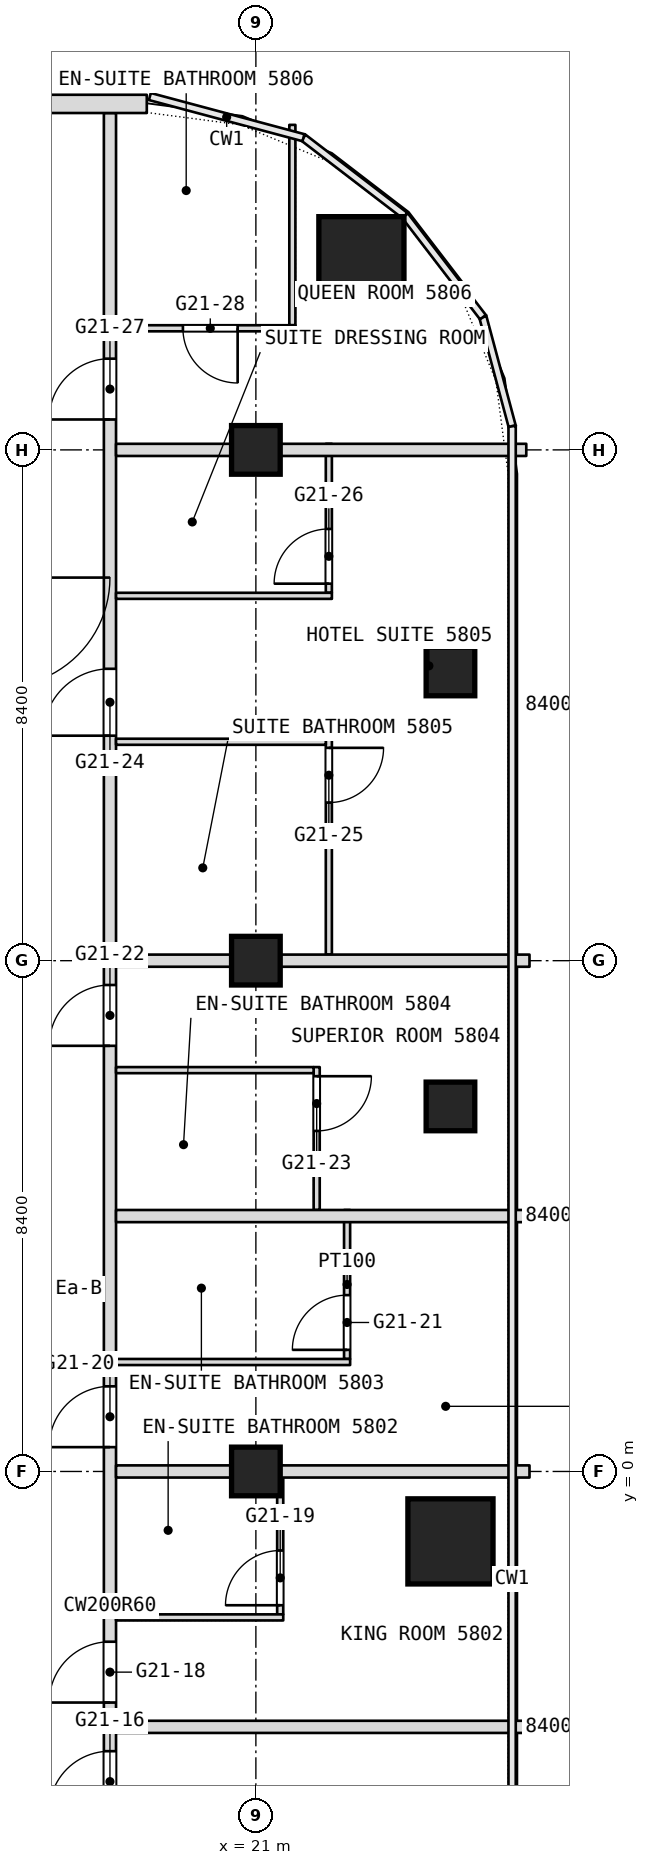
"""IFC4 building model, lengths in metres.
Left out: names, types, materials, properties, quantities, classifications, styles, units other than length and angle.
Written with IfcOpenShell. Run it as: python <this file> out.ifc"""

import sys

from ifc_helpers import new_model, si_unit, direction, frame, frame_2d, origin, origin_2d, place, context, subcontext, project, spatial, rectangle, extrude, element, fill, save


model = new_model("IFC4")
c1 = context("Model", 3, precision=1e-05, world=origin(), true_north=direction((0.0, 1.0)))
c2 = subcontext(c1, "Body", "Model", "MODEL_VIEW")
j1 = project(units=[si_unit("LENGTHUNIT", "METRE"), si_unit("PLANEANGLEUNIT", "RADIAN")], contexts=[c1])
p1 = place(None, origin())
s1 = spatial("IfcSite", under=j1, at=p1, CompositionType="ELEMENT")
p2 = place(p1, origin())
s2 = spatial("IfcBuilding", under=s1, at=p2, CompositionType="ELEMENT")
p3 = place(p2, frame((0.0, 0.0, 245.3)))
s3 = spatial("IfcBuildingStorey", under=s2, at=p3, CompositionType="ELEMENT", Elevation=245.3)
for number, where, z_axis, x_axis in (
    (1, (24.2, -1.15, 0.0), (0.0, 0.0, 1.0), (1.0, 0.0, 0.0)),
    (2, (22.736, 19.936, 0.0), (0.0, 0.0, 1.0), (1.0, 0.0, 0.0)),
):
    element("IfcColumn", number, at=place(p3, frame(where, z_axis=z_axis, x_axis=x_axis)), inside=s3, PredefinedType="COLUMN", context=c2, shape_type="SweptSolid", body=[
        extrude(rectangle(XDim=1.4, YDim=1.4, at=origin_2d()), origin(), (0.0, 0.0, 1.0), 3.6),
    ])
for number, where, z_axis, x_axis in (
    (3, (21.0, 0.0, 0.0), (0.0, 0.0, 1.0), (1.0, 0.0, 0.0)),
    (4, (21.0, 8.4, 0.0), (0.0, 0.0, 1.0), (1.0, 0.0, 0.0)),
    (5, (21.0, 16.8, 0.0), (0.0, 0.0, 1.0), (1.0, 0.0, 0.0)),
    (6, (24.2, 13.156, 0.0), (0.0, 0.0, 1.0), (1.0, 0.0, 0.0)),
    (7, (24.2, 6.003, 0.0), (0.0, 0.0, 1.0), (1.0, 0.0, 0.0)),
):
    element("IfcColumn", number, at=place(p3, frame(where, z_axis=z_axis, x_axis=x_axis)), inside=s3, PredefinedType="COLUMN", context=c2, shape_type="SweptSolid", body=[
        extrude(rectangle(XDim=0.8, YDim=0.8, at=origin_2d()), origin(), (0.0, 0.0, 1.0), 3.6),
    ])
p4 = place(p3, frame((22.5, 1.85, 0.0), z_axis=(0.0, 0.0, 1.0), x_axis=(0.0, 1.0, 0.0)))
e8 = element("IfcWall", 8, at=p4, inside=s3, PredefinedType="PARTITIONING", context=c2, shape_type="SweptSolid", body=[
    extrude(rectangle(XDim=2.45, YDim=0.1, at=frame_2d((1.225, 0.0))), origin(), (0.0, 0.0, 1.0), 3.34),
])
p5 = place(p4, frame((0.15, 0.0, 0.0)))
e9 = element("IfcOpeningElement", 9, at=p5, cuts=e8, PredefinedType="OPENING", context=c2, shape_type="SweptSolid", body=[
    extrude(rectangle(XDim=0.9, YDim=2.1, at=frame_2d((0.45, 1.05))), frame((0.0, 0.05, 0.0), z_axis=(0.0, -1.0, 0.0), x_axis=(1.0, 0.0, 0.0)), (0.0, 0.0, 1.0), 0.1),
])
p6 = place(p3, frame((22.2, 8.5, 0.0), z_axis=(0.0, 0.0, 1.0), x_axis=(0.0, 1.0, 0.0)))
e10 = element("IfcWall", 10, at=p6, inside=s3, PredefinedType="PARTITIONING", context=c2, shape_type="SweptSolid", body=[
    extrude(rectangle(XDim=3.55, YDim=0.1, at=frame_2d((1.775, 0.0))), origin(), (0.0, 0.0, 1.0), 3.34),
])
p7 = place(p6, frame((2.5, 0.0, 0.0)))
e11 = element("IfcOpeningElement", 11, at=p7, cuts=e10, PredefinedType="OPENING", context=c2, shape_type="SweptSolid", body=[
    extrude(rectangle(XDim=0.9, YDim=2.1, at=frame_2d((0.45, 1.05))), frame((0.0, 0.05, 0.0), z_axis=(0.0, -1.0, 0.0), x_axis=(1.0, 0.0, 0.0)), (0.0, 0.0, 1.0), 0.1),
])
p8 = place(p3, frame((22.2, 14.45, 0.0), z_axis=(0.0, 0.0, 1.0), x_axis=(0.0, 1.0, 0.0)))
e12 = element("IfcWall", 12, at=p8, inside=s3, PredefinedType="PARTITIONING", context=c2, shape_type="SweptSolid", body=[
    extrude(rectangle(XDim=2.45, YDim=0.1, at=frame_2d((1.225, 0.0))), origin(), (0.0, 0.0, 1.0), 3.34),
])
p9 = place(p8, frame((0.15, 0.0, 0.0)))
e13 = element("IfcOpeningElement", 13, at=p9, cuts=e12, PredefinedType="OPENING", context=c2, shape_type="SweptSolid", body=[
    extrude(rectangle(XDim=0.9, YDim=2.1, at=frame_2d((0.45, 1.05))), frame((0.0, 0.05, 0.0), z_axis=(0.0, -1.0, 0.0), x_axis=(1.0, 0.0, 0.0)), (0.0, 0.0, 1.0), 0.1),
])
p10 = place(p3, frame((22.0, 4.3, 0.0), z_axis=(0.0, 0.0, 1.0), x_axis=(0.0, 1.0, 0.0)))
e14 = element("IfcWall", 14, at=p10, inside=s3, PredefinedType="PARTITIONING", context=c2, shape_type="SweptSolid", body=[
    extrude(rectangle(XDim=2.35, YDim=0.1, at=frame_2d((1.175, 0.0))), origin(), (0.0, 0.0, 1.0), 3.34),
])
p11 = place(p10, frame((1.3, 0.0, 0.0)))
e15 = element("IfcOpeningElement", 15, at=p11, cuts=e14, PredefinedType="OPENING", context=c2, shape_type="SweptSolid", body=[
    extrude(rectangle(XDim=0.9, YDim=2.1, at=frame_2d((0.45, 1.05))), frame((0.0, 0.05, 0.0), z_axis=(0.0, -1.0, 0.0), x_axis=(1.0, 0.0, 0.0)), (0.0, 0.0, 1.0), 0.1),
])
p12 = place(p3, frame((21.6, 18.85, 0.0), z_axis=(0.0, 0.0, 1.0), x_axis=(0.0, 1.0, 0.0)))
e16 = element("IfcWall", 16, at=p12, inside=s3, PredefinedType="PARTITIONING", context=c2, shape_type="SweptSolid", body=[
    extrude(rectangle(XDim=3.295, YDim=0.1, at=frame_2d((1.647, 0.0))), origin(), (0.0, 0.0, 1.0), 3.34),
])
p13 = place(p3, frame((21.4, -2.35, 0.0), z_axis=(0.0, 0.0, 1.0), x_axis=(0.0, 1.0, 0.0)))
e17 = element("IfcWall", 17, at=p13, inside=s3, PredefinedType="PARTITIONING", context=c2, shape_type="SweptSolid", body=[
    extrude(rectangle(XDim=2.45, YDim=0.1, at=frame_2d((1.225, 0.0))), origin(), (0.0, 0.0, 1.0), 3.34),
])
p14 = place(p13, frame((0.15, 0.0, 0.0)))
e18 = element("IfcOpeningElement", 18, at=p14, cuts=e17, PredefinedType="OPENING", context=c2, shape_type="SweptSolid", body=[
    extrude(rectangle(XDim=0.9, YDim=2.1, at=frame_2d((0.45, 1.05))), frame((0.0, 0.05, 0.0), z_axis=(0.0, -1.0, 0.0), x_axis=(1.0, 0.0, 0.0)), (0.0, 0.0, 1.0), 0.1),
])
p15 = place(p3, frame((18.6, -26.751, 0.0), z_axis=(0.0, 0.0, 1.0), x_axis=(0.0, 1.0, 0.0)))
e19 = element("IfcWall", 19, at=p15, inside=s3, PredefinedType="PARTITIONING", context=c2, shape_type="SweptSolid", body=[
    extrude(rectangle(XDim=49.091, YDim=0.2, at=frame_2d((24.545, 0.0))), origin(), (0.0, 0.0, 1.0), 3.34),
])
p16 = place(p15, frame((4.226, 0.0, 0.0)))
e20 = element("IfcOpeningElement", 20, at=p16, cuts=e19, PredefinedType="OPENING", context=c2, shape_type="SweptSolid", body=[
    extrude(rectangle(XDim=1.8, YDim=2.1, at=frame_2d((0.9, 1.05))), frame((0.0, 0.1, 0.0), z_axis=(0.0, -1.0, 0.0), x_axis=(1.0, 0.0, 0.0)), (0.0, 0.0, 1.0), 0.2),
])
p17 = place(p15, frame((13.251, 0.0, 0.0)))
e21 = element("IfcOpeningElement", 21, at=p17, cuts=e19, PredefinedType="OPENING", context=c2, shape_type="SweptSolid", body=[
    extrude(rectangle(XDim=1.8, YDim=2.1, at=frame_2d((0.9, 1.05))), frame((0.0, 0.1, 0.0), z_axis=(0.0, -1.0, 0.0), x_axis=(1.0, 0.0, 0.0)), (0.0, 0.0, 1.0), 0.2),
])
p18 = place(p15, frame((21.151, 0.0, 0.0)))
e22 = element("IfcOpeningElement", 22, at=p18, cuts=e19, PredefinedType="OPENING", context=c2, shape_type="SweptSolid", body=[
    extrude(rectangle(XDim=1.0, YDim=2.1, at=frame_2d((0.5, 1.05))), frame((0.0, 0.1, 0.0), z_axis=(0.0, -1.0, 0.0), x_axis=(1.0, 0.0, 0.0)), (0.0, 0.0, 1.0), 0.2),
])
p19 = place(p15, frame((22.951, 0.0, 0.0)))
e23 = element("IfcOpeningElement", 23, at=p19, cuts=e19, PredefinedType="OPENING", context=c2, shape_type="SweptSolid", body=[
    extrude(rectangle(XDim=1.0, YDim=2.1, at=frame_2d((0.5, 1.05))), frame((0.0, 0.1, 0.0), z_axis=(0.0, -1.0, 0.0), x_axis=(1.0, 0.0, 0.0)), (0.0, 0.0, 1.0), 0.2),
])
p20 = place(p15, frame((27.151, 0.0, 0.0)))
e24 = element("IfcOpeningElement", 24, at=p20, cuts=e19, PredefinedType="OPENING", context=c2, shape_type="SweptSolid", body=[
    extrude(rectangle(XDim=1.0, YDim=2.1, at=frame_2d((0.5, 1.05))), frame((0.0, 0.1, 0.0), z_axis=(0.0, -1.0, 0.0), x_axis=(1.0, 0.0, 0.0)), (0.0, 0.0, 1.0), 0.2),
])
p21 = place(p15, frame((33.751, 0.0, 0.0)))
e25 = element("IfcOpeningElement", 25, at=p21, cuts=e19, PredefinedType="OPENING", context=c2, shape_type="SweptSolid", body=[
    extrude(rectangle(XDim=1.0, YDim=2.1, at=frame_2d((0.5, 1.05))), frame((0.0, 0.1, 0.0), z_axis=(0.0, -1.0, 0.0), x_axis=(1.0, 0.0, 0.0)), (0.0, 0.0, 1.0), 0.2),
])
p22 = place(p15, frame((38.851, 0.0, 0.0)))
e26 = element("IfcOpeningElement", 26, at=p22, cuts=e19, PredefinedType="OPENING", context=c2, shape_type="SweptSolid", body=[
    extrude(rectangle(XDim=1.1, YDim=2.1, at=frame_2d((0.55, 1.05))), frame((0.0, 0.1, 0.0), z_axis=(0.0, -1.0, 0.0), x_axis=(1.0, 0.0, 0.0)), (0.0, 0.0, 1.0), 0.2),
])
p23 = place(p15, frame((44.051, 0.0, 0.0)))
e27 = element("IfcOpeningElement", 27, at=p23, cuts=e19, PredefinedType="OPENING", context=c2, shape_type="SweptSolid", body=[
    extrude(rectangle(XDim=1.0, YDim=2.1, at=frame_2d((0.5, 1.05))), frame((0.0, 0.1, 0.0), z_axis=(0.0, -1.0, 0.0), x_axis=(1.0, 0.0, 0.0)), (0.0, 0.0, 1.0), 0.2),
])
p24 = place(p3, frame((18.7, -4.2, 0.0), z_axis=(0.0, 0.0, 1.0), x_axis=(1.0, 0.0, 0.0)))
e28 = element("IfcWall", 28, at=p24, inside=s3, PredefinedType="PARTITIONING", context=c2, shape_type="SweptSolid", body=[
    extrude(rectangle(XDim=6.8, YDim=0.2, at=frame_2d((3.4, 0.0))), origin(), (0.0, 0.0, 1.0), 3.34),
])
p25 = place(p3, frame((18.7, -2.4, 0.0), z_axis=(0.0, 0.0, 1.0), x_axis=(1.0, 0.0, 0.0)))
e29 = element("IfcWall", 29, at=p25, inside=s3, PredefinedType="PARTITIONING", context=c2, shape_type="SweptSolid", body=[
    extrude(rectangle(XDim=2.75, YDim=0.1, at=frame_2d((1.375, 0.0))), origin(), (0.0, 0.0, 1.0), 3.34),
])
p26 = place(p3, frame((18.7, 0.0, 0.0), z_axis=(0.0, 0.0, 1.0), x_axis=(1.0, 0.0, 0.0)))
e30 = element("IfcWall", 30, at=p26, inside=s3, PredefinedType="PARTITIONING", context=c2, shape_type="SweptSolid", body=[
    extrude(rectangle(XDim=6.8, YDim=0.2, at=frame_2d((3.4, 0.0))), origin(), (0.0, 0.0, 1.0), 2.94),
])
p27 = place(p3, frame((18.7, 1.8, 0.0), z_axis=(0.0, 0.0, 1.0), x_axis=(1.0, 0.0, 0.0)))
e31 = element("IfcWall", 31, at=p27, inside=s3, PredefinedType="PARTITIONING", context=c2, shape_type="SweptSolid", body=[
    extrude(rectangle(XDim=3.85, YDim=0.1, at=frame_2d((1.925, 0.0))), origin(), (0.0, 0.0, 1.0), 3.34),
])
p28 = place(p3, frame((18.7, 4.2, 0.0), z_axis=(0.0, 0.0, 1.0), x_axis=(1.0, 0.0, 0.0)))
e32 = element("IfcWall", 32, at=p28, inside=s3, PredefinedType="PARTITIONING", context=c2, shape_type="SweptSolid", body=[
    extrude(rectangle(XDim=6.8, YDim=0.2, at=frame_2d((3.4, 0.0))), origin(), (0.0, 0.0, 1.0), 3.34),
])
p29 = place(p3, frame((18.7, 6.6, 0.0), z_axis=(0.0, 0.0, 1.0), x_axis=(1.0, 0.0, 0.0)))
e33 = element("IfcWall", 33, at=p29, inside=s3, PredefinedType="PARTITIONING", context=c2, shape_type="SweptSolid", body=[
    extrude(rectangle(XDim=3.25, YDim=0.1, at=frame_2d((1.625, 0.0))), origin(), (0.0, 0.0, 1.0), 3.34),
])
p30 = place(p3, frame((18.7, 8.4, 0.0), z_axis=(0.0, 0.0, 1.0), x_axis=(1.0, 0.0, 0.0)))
e34 = element("IfcWall", 34, at=p30, inside=s3, PredefinedType="PARTITIONING", context=c2, shape_type="SweptSolid", body=[
    extrude(rectangle(XDim=6.8, YDim=0.2, at=frame_2d((3.4, 0.0))), origin(), (0.0, 0.0, 1.0), 2.94),
])
p31 = place(p3, frame((18.7, 12.0, 0.0), z_axis=(0.0, 0.0, 1.0), x_axis=(1.0, 0.0, 0.0)))
e35 = element("IfcWall", 35, at=p31, inside=s3, PredefinedType="PARTITIONING", context=c2, shape_type="SweptSolid", body=[
    extrude(rectangle(XDim=3.45, YDim=0.1, at=frame_2d((1.725, 0.0))), origin(), (0.0, 0.0, 1.0), 3.34),
])
p32 = place(p3, frame((18.7, 14.4, 0.0), z_axis=(0.0, 0.0, 1.0), x_axis=(1.0, 0.0, 0.0)))
e36 = element("IfcWall", 36, at=p32, inside=s3, PredefinedType="PARTITIONING", context=c2, shape_type="SweptSolid", body=[
    extrude(rectangle(XDim=3.55, YDim=0.1, at=frame_2d((1.775, 0.0))), origin(), (0.0, 0.0, 1.0), 3.34),
])
p33 = place(p3, frame((18.7, 16.8, 0.0), z_axis=(0.0, 0.0, 1.0), x_axis=(1.0, 0.0, 0.0)))
e37 = element("IfcWall", 37, at=p33, inside=s3, PredefinedType="PARTITIONING", context=c2, shape_type="SweptSolid", body=[
    extrude(rectangle(XDim=6.747, YDim=0.2, at=frame_2d((3.374, 0.0))), origin(), (0.0, 0.0, 1.0), 2.94),
])
p34 = place(p3, frame((18.7, 18.8, 0.0), z_axis=(0.0, 0.0, 1.0), x_axis=(1.0, 0.0, 0.0)))
e38 = element("IfcWall", 38, at=p34, inside=s3, PredefinedType="PARTITIONING", context=c2, shape_type="SweptSolid", body=[
    extrude(rectangle(XDim=2.95, YDim=0.1, at=frame_2d((1.475, 0.0))), origin(), (0.0, 0.0, 1.0), 3.34),
])
p35 = place(p34, frame((1.1, 0.0, 0.0)))
e39 = element("IfcOpeningElement", 39, at=p35, cuts=e38, PredefinedType="OPENING", context=c2, shape_type="SweptSolid", body=[
    extrude(rectangle(XDim=0.9, YDim=2.1, at=frame_2d((0.45, 1.05))), frame((0.0, 0.05, 0.0), z_axis=(0.0, -1.0, 0.0), x_axis=(1.0, 0.0, 0.0)), (0.0, 0.0, 1.0), 0.1),
])
p36 = place(p3, frame((19.206, 22.49, 0.0), z_axis=(0.0, 0.0, 1.0), x_axis=(-1.0, 0.0, 0.0)))
e40 = element("IfcWall", 40, at=p36, inside=s3, PredefinedType="NOTDEFINED", context=c2, shape_type="SweptSolid", body=[
    extrude(rectangle(XDim=38.412, YDim=0.3, at=frame_2d((19.206, 0.0))), origin(), (0.0, 0.0, 1.0), 3.6),
])
p37 = place(p36, frame((3.306, 0.0, 0.9)))
e41 = element("IfcOpeningElement", 41, at=p37, cuts=e40, PredefinedType="OPENING", context=c2, shape_type="SweptSolid", body=[
    extrude(rectangle(XDim=2.4, YDim=2.1, at=frame_2d((1.2, 1.05))), frame((0.0, 0.15, 0.0), z_axis=(0.0, -1.0, 0.0), x_axis=(1.0, 0.0, 0.0)), (0.0, 0.0, 1.0), 0.3),
])
p38 = place(p36, frame((7.506, 0.0, 0.9)))
e42 = element("IfcOpeningElement", 42, at=p38, cuts=e40, PredefinedType="OPENING", context=c2, shape_type="SweptSolid", body=[
    extrude(rectangle(XDim=2.4, YDim=2.1, at=frame_2d((1.2, 1.05))), frame((0.0, 0.15, 0.0), z_axis=(0.0, -1.0, 0.0), x_axis=(1.0, 0.0, 0.0)), (0.0, 0.0, 1.0), 0.3),
])
p39 = place(p36, frame((11.706, 0.0, 0.9)))
e43 = element("IfcOpeningElement", 43, at=p39, cuts=e40, PredefinedType="OPENING", context=c2, shape_type="SweptSolid", body=[
    extrude(rectangle(XDim=2.4, YDim=2.1, at=frame_2d((1.2, 1.05))), frame((0.0, 0.15, 0.0), z_axis=(0.0, -1.0, 0.0), x_axis=(1.0, 0.0, 0.0)), (0.0, 0.0, 1.0), 0.3),
])
p40 = place(p36, frame((15.906, 0.0, 0.9)))
e44 = element("IfcOpeningElement", 44, at=p40, cuts=e40, PredefinedType="OPENING", context=c2, shape_type="SweptSolid", body=[
    extrude(rectangle(XDim=2.4, YDim=2.1, at=frame_2d((1.2, 1.05))), frame((0.0, 0.15, 0.0), z_axis=(0.0, -1.0, 0.0), x_axis=(1.0, 0.0, 0.0)), (0.0, 0.0, 1.0), 0.3),
])
p41 = place(p36, frame((20.106, 0.0, 0.9)))
e45 = element("IfcOpeningElement", 45, at=p41, cuts=e40, PredefinedType="OPENING", context=c2, shape_type="SweptSolid", body=[
    extrude(rectangle(XDim=2.4, YDim=2.1, at=frame_2d((1.2, 1.05))), frame((0.0, 0.15, 0.0), z_axis=(0.0, -1.0, 0.0), x_axis=(1.0, 0.0, 0.0)), (0.0, 0.0, 1.0), 0.3),
])
p42 = place(p36, frame((24.306, 0.0, 0.9)))
e46 = element("IfcOpeningElement", 46, at=p42, cuts=e40, PredefinedType="OPENING", context=c2, shape_type="SweptSolid", body=[
    extrude(rectangle(XDim=2.4, YDim=2.1, at=frame_2d((1.2, 1.05))), frame((0.0, 0.15, 0.0), z_axis=(0.0, -1.0, 0.0), x_axis=(1.0, 0.0, 0.0)), (0.0, 0.0, 1.0), 0.3),
])
p43 = place(p36, frame((28.506, 0.0, 0.9)))
e47 = element("IfcOpeningElement", 47, at=p43, cuts=e40, PredefinedType="OPENING", context=c2, shape_type="SweptSolid", body=[
    extrude(rectangle(XDim=2.4, YDim=2.1, at=frame_2d((1.2, 1.05))), frame((0.0, 0.15, 0.0), z_axis=(0.0, -1.0, 0.0), x_axis=(1.0, 0.0, 0.0)), (0.0, 0.0, 1.0), 0.3),
])
p44 = place(p36, frame((32.706, 0.0, 0.9)))
e48 = element("IfcOpeningElement", 48, at=p44, cuts=e40, PredefinedType="OPENING", context=c2, shape_type="SweptSolid", body=[
    extrude(rectangle(XDim=2.4, YDim=2.1, at=frame_2d((1.2, 1.05))), frame((0.0, 0.15, 0.0), z_axis=(0.0, -1.0, 0.0), x_axis=(1.0, 0.0, 0.0)), (0.0, 0.0, 1.0), 0.3),
])
p45 = place(p5, origin())
e49 = element("IfcDoor", 49, at=p45, inside=s3, OperationType="SINGLE_SWING_LEFT", PredefinedType="DOOR", context=c2, shape_type="SweptSolid", body=[
    extrude(rectangle(XDim=0.9, YDim=2.1, at=frame_2d((0.45, 1.05))), frame((0.0, 0.025, 0.0), z_axis=(0.0, -1.0, 0.0), x_axis=(1.0, 0.0, 0.0)), (0.0, 0.0, 1.0), 0.05),
])
fill(e9, e49)
p46 = place(p7, origin())
e50 = element("IfcDoor", 50, at=p46, inside=s3, OperationType="SINGLE_SWING_RIGHT", PredefinedType="DOOR", context=c2, shape_type="SweptSolid", body=[
    extrude(rectangle(XDim=0.9, YDim=2.1, at=frame_2d((0.45, 1.05))), frame((0.0, 0.025, 0.0), z_axis=(0.0, -1.0, 0.0), x_axis=(1.0, 0.0, 0.0)), (0.0, 0.0, 1.0), 0.05),
])
fill(e11, e50)
p47 = place(p9, origin())
e51 = element("IfcDoor", 51, at=p47, inside=s3, OperationType="SINGLE_SWING_LEFT", PredefinedType="DOOR", context=c2, shape_type="SweptSolid", body=[
    extrude(rectangle(XDim=0.9, YDim=2.1, at=frame_2d((0.45, 1.05))), frame((0.0, 0.025, 0.0), z_axis=(0.0, -1.0, 0.0), x_axis=(1.0, 0.0, 0.0)), (0.0, 0.0, 1.0), 0.05),
])
fill(e13, e51)
p48 = place(p11, origin())
e52 = element("IfcDoor", 52, at=p48, inside=s3, OperationType="SINGLE_SWING_RIGHT", PredefinedType="DOOR", context=c2, shape_type="SweptSolid", body=[
    extrude(rectangle(XDim=0.9, YDim=2.1, at=frame_2d((0.45, 1.05))), frame((0.0, 0.025, 0.0), z_axis=(0.0, -1.0, 0.0), x_axis=(1.0, 0.0, 0.0)), (0.0, 0.0, 1.0), 0.05),
])
fill(e15, e52)
p49 = place(p14, origin())
e53 = element("IfcDoor", 53, at=p49, inside=s3, OperationType="SINGLE_SWING_LEFT", PredefinedType="DOOR", context=c2, shape_type="SweptSolid", body=[
    extrude(rectangle(XDim=0.9, YDim=2.1, at=frame_2d((0.45, 1.05))), frame((0.0, 0.025, 0.0), z_axis=(0.0, -1.0, 0.0), x_axis=(1.0, 0.0, 0.0)), (0.0, 0.0, 1.0), 0.05),
])
fill(e18, e53)
p50 = place(p18, origin())
e54 = element("IfcDoor", 54, at=p50, inside=s3, OperationType="SINGLE_SWING_RIGHT", PredefinedType="DOOR", context=c2, shape_type="SweptSolid", body=[
    extrude(rectangle(XDim=1.0, YDim=2.1, at=frame_2d((0.5, 1.05))), frame((0.0, 0.025, 0.0), z_axis=(0.0, -1.0, 0.0), x_axis=(1.0, 0.0, 0.0)), (0.0, 0.0, 1.0), 0.05),
])
fill(e22, e54)
p51 = place(p19, origin())
e55 = element("IfcDoor", 55, at=p51, inside=s3, OperationType="SINGLE_SWING_RIGHT", PredefinedType="DOOR", context=c2, shape_type="SweptSolid", body=[
    extrude(rectangle(XDim=1.0, YDim=2.1, at=frame_2d((0.5, 1.05))), frame((0.0, 0.025, 0.0), z_axis=(0.0, -1.0, 0.0), x_axis=(1.0, 0.0, 0.0)), (0.0, 0.0, 1.0), 0.05),
])
fill(e23, e55)
p52 = place(p20, origin())
e56 = element("IfcDoor", 56, at=p52, inside=s3, OperationType="SINGLE_SWING_RIGHT", PredefinedType="DOOR", context=c2, shape_type="SweptSolid", body=[
    extrude(rectangle(XDim=1.0, YDim=2.1, at=frame_2d((0.5, 1.05))), frame((0.0, 0.025, 0.0), z_axis=(0.0, -1.0, 0.0), x_axis=(1.0, 0.0, 0.0)), (0.0, 0.0, 1.0), 0.05),
])
fill(e24, e56)
p53 = place(p21, origin())
e57 = element("IfcDoor", 57, at=p53, inside=s3, OperationType="SINGLE_SWING_RIGHT", PredefinedType="DOOR", context=c2, shape_type="SweptSolid", body=[
    extrude(rectangle(XDim=1.0, YDim=2.1, at=frame_2d((0.5, 1.05))), frame((0.0, 0.025, 0.0), z_axis=(0.0, -1.0, 0.0), x_axis=(1.0, 0.0, 0.0)), (0.0, 0.0, 1.0), 0.05),
])
fill(e25, e57)
p54 = place(p22, origin())
e58 = element("IfcDoor", 58, at=p54, inside=s3, OperationType="SINGLE_SWING_RIGHT", PredefinedType="DOOR", context=c2, shape_type="SweptSolid", body=[
    extrude(rectangle(XDim=1.1, YDim=2.1, at=frame_2d((0.55, 1.05))), frame((0.0, 0.025, 0.0), z_axis=(0.0, -1.0, 0.0), x_axis=(1.0, 0.0, 0.0)), (0.0, 0.0, 1.0), 0.05),
])
fill(e26, e58)
p55 = place(p23, origin())
e59 = element("IfcDoor", 59, at=p55, inside=s3, OperationType="SINGLE_SWING_LEFT", PredefinedType="DOOR", context=c2, shape_type="SweptSolid", body=[
    extrude(rectangle(XDim=1.0, YDim=2.1, at=frame_2d((0.5, 1.05))), frame((0.0, 0.025, 0.0), z_axis=(0.0, -1.0, 0.0), x_axis=(1.0, 0.0, 0.0)), (0.0, 0.0, 1.0), 0.05),
])
fill(e27, e59)
p56 = place(p35, origin())
e60 = element("IfcDoor", 60, at=p56, inside=s3, OperationType="SINGLE_SWING_RIGHT", PredefinedType="DOOR", context=c2, shape_type="SweptSolid", body=[
    extrude(rectangle(XDim=0.9, YDim=2.1, at=frame_2d((0.45, 1.05))), frame((0.0, 0.025, 0.0), z_axis=(0.0, -1.0, 0.0), x_axis=(1.0, 0.0, 0.0)), (0.0, 0.0, 1.0), 0.05),
])
fill(e39, e60)
save(model, sys.argv[1])
